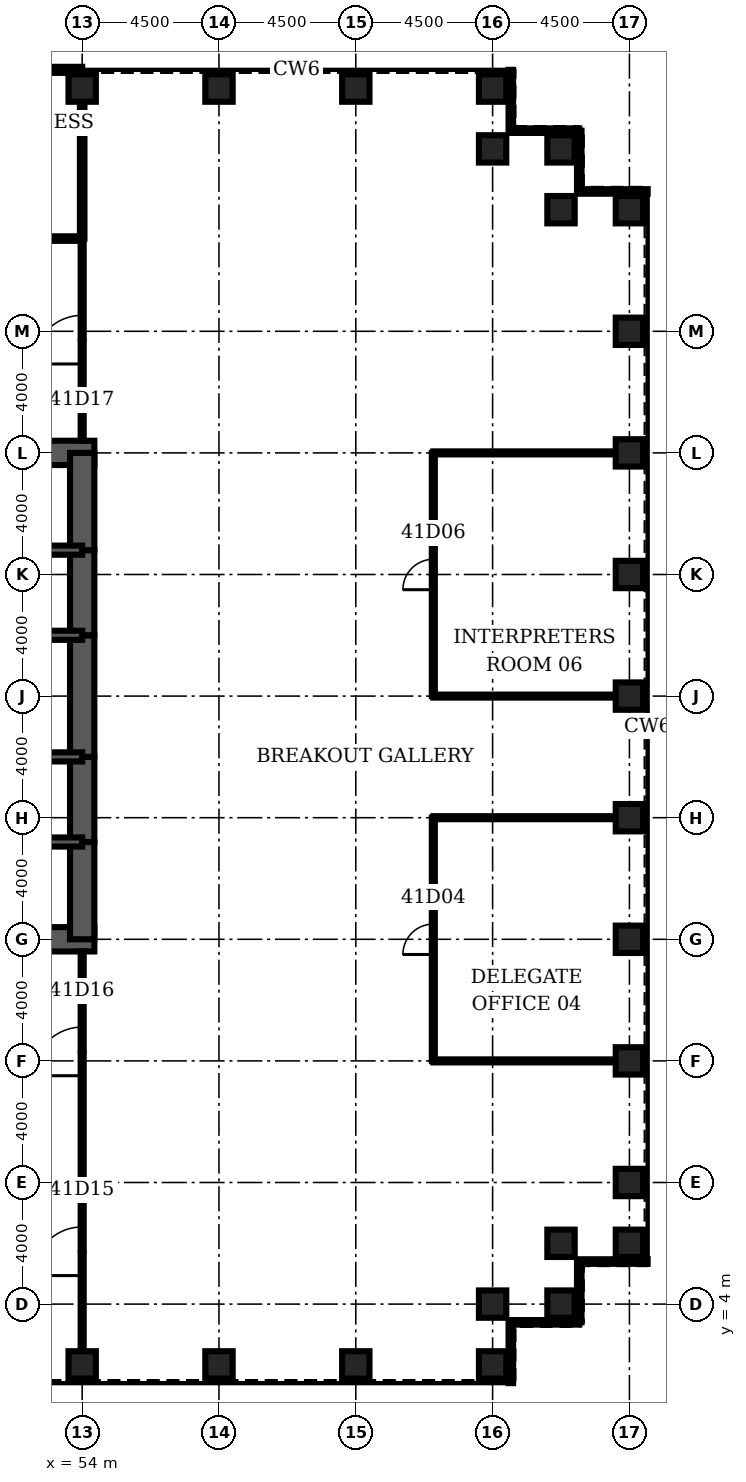
"""IFC4 building model, lengths in metres.
Left out: names, types, materials, properties, quantities, classifications, styles, units other than length and angle.
Written with IfcOpenShell. Run it as: python <this file> out.ifc"""

import sys

from ifc_helpers import new_model, si_unit, direction, frame, frame_2d, origin, origin_2d, place, context, subcontext, project, spatial, rectangle, hollow_rectangle, extrude, element, fill, save


model = new_model("IFC4")
c1 = context("Model", 3, precision=1e-05, world=origin(), true_north=direction((0.0, 1.0)))
c2 = subcontext(c1, "Body", "Model", "MODEL_VIEW")
j1 = project(units=[si_unit("LENGTHUNIT", "METRE"), si_unit("PLANEANGLEUNIT", "RADIAN")], contexts=[c1])
p1 = place(None, origin())
s1 = spatial("IfcSite", under=j1, at=p1, CompositionType="ELEMENT")
p2 = place(p1, origin())
s2 = spatial("IfcBuilding", under=s1, at=p2, CompositionType="ELEMENT")
p3 = place(p2, frame((0.0, 0.0, 185.8)))
s3 = spatial("IfcBuildingStorey", under=s2, at=p3, CompositionType="ELEMENT", Elevation=185.8)
for number, where, z_axis, x_axis in (
    (1, (54.0, 2.0, 0.0), (0.0, 0.0, 1.0), (0.0, 1.0, 0.0)),
    (2, (58.5, 2.0, 0.0), (0.0, 0.0, 1.0), (0.0, 1.0, 0.0)),
    (3, (63.0, 2.0, 0.0), (0.0, 0.0, 1.0), (0.0, 1.0, 0.0)),
    (4, (67.5, 2.0, 0.0), (0.0, 0.0, 1.0), (0.0, 1.0, 0.0)),
    (5, (67.5, 4.0, 0.0), (0.0, 0.0, 1.0), (0.0, 1.0, 0.0)),
    (6, (69.75, 4.0, 0.0), (0.0, 0.0, 1.0), (1.0, 0.0, 0.0)),
    (7, (69.75, 6.0, 0.0), (0.0, 0.0, 1.0), (1.0, 0.0, 0.0)),
    (8, (72.0, 6.0, 0.0), (0.0, 0.0, 1.0), (1.0, 0.0, 0.0)),
    (9, (72.0, 8.0, 0.0), (0.0, 0.0, 1.0), (1.0, 0.0, 0.0)),
    (10, (72.0, 12.0, 0.0), (0.0, 0.0, 1.0), (1.0, 0.0, 0.0)),
    (11, (72.0, 16.0, 0.0), (0.0, 0.0, 1.0), (1.0, 0.0, 0.0)),
    (12, (72.0, 20.0, 0.0), (0.0, 0.0, 1.0), (1.0, 0.0, 0.0)),
    (13, (72.0, 24.0, 0.0), (0.0, 0.0, 1.0), (1.0, 0.0, 0.0)),
    (14, (72.0, 28.0, 0.0), (0.0, 0.0, 1.0), (1.0, 0.0, 0.0)),
    (15, (72.0, 32.0, 0.0), (0.0, 0.0, 1.0), (1.0, 0.0, 0.0)),
    (16, (72.0, 36.0, 0.0), (0.0, 0.0, 1.0), (1.0, 0.0, 0.0)),
    (17, (72.0, 40.0, 0.0), (0.0, 0.0, 1.0), (1.0, 0.0, 0.0)),
    (18, (69.75, 40.0, 0.0), (0.0, 0.0, 1.0), (1.0, 0.0, 0.0)),
    (19, (69.75, 42.0, 0.0), (0.0, 0.0, 1.0), (1.0, 0.0, 0.0)),
    (20, (67.5, 42.0, 0.0), (0.0, 0.0, 1.0), (0.0, 1.0, 0.0)),
    (21, (67.5, 44.0, 0.0), (0.0, 0.0, 1.0), (0.0, 1.0, 0.0)),
    (22, (63.0, 44.0, 0.0), (0.0, 0.0, 1.0), (0.0, 1.0, 0.0)),
    (23, (58.5, 44.0, 0.0), (0.0, 0.0, 1.0), (0.0, 1.0, 0.0)),
    (24, (54.0, 44.0, 0.0), (0.0, 0.0, 1.0), (0.0, 1.0, 0.0)),
):
    element("IfcColumn", number, at=place(p3, frame(where, z_axis=z_axis, x_axis=x_axis)), inside=s3, PredefinedType="COLUMN", context=c2, shape_type="SweptSolid", body=[
        extrude(hollow_rectangle(XDim=0.9, YDim=0.9, WallThickness=0.09, at=origin_2d()), origin(), (0.0, 0.0, 1.0), 4.2),
    ])
for number, where, z_axis, x_axis in (
    (25, (45.0, 16.0, 0.0), (0.0, 0.0, 1.0), (1.0, 0.0, 0.0)),
    (26, (54.4, 32.0, 0.0), (0.0, 0.0, 1.0), (-1.0, 0.0, 0.0)),
):
    element("IfcWall", number, at=place(p3, frame(where, z_axis=z_axis, x_axis=x_axis)), inside=s3, PredefinedType="SHEAR", context=c2, shape_type="SweptSolid", body=[
        extrude(rectangle(XDim=9.4, YDim=0.8, at=frame_2d((4.7, 0.0))), origin(), (0.0, 0.0, 1.0), 4.2),
    ])
p4 = place(p3, frame((54.0, 16.0, 0.0), z_axis=(0.0, 0.0, 1.0), x_axis=(0.0, 1.0, 0.0)))
e27 = element("IfcWall", 27, at=p4, inside=s3, PredefinedType="SHEAR", context=c2, shape_type="SweptSolid", body=[
    extrude(rectangle(XDim=3.2, YDim=0.8, at=frame_2d((1.6, 0.0))), origin(), (0.0, 0.0, 1.0), 4.2),
])
p5 = place(p3, frame((54.0, 19.2, 0.0), z_axis=(0.0, 0.0, 1.0), x_axis=(0.0, 1.0, 0.0)))
e28 = element("IfcWall", 28, at=p5, inside=s3, PredefinedType="SHEAR", context=c2, shape_type="SweptSolid", body=[
    extrude(rectangle(XDim=2.8, YDim=0.8, at=frame_2d((1.4, 0.0))), origin(), (0.0, 0.0, 1.0), 4.2),
])
p6 = place(p5, frame((0.4, 0.0, 0.0)))
e29 = element("IfcOpeningElement", 29, at=p6, cuts=e28, PredefinedType="OPENING", context=c2, shape_type="SweptSolid", body=[
    extrude(rectangle(XDim=1.8, YDim=2.1, at=frame_2d((0.9, 1.05))), frame((0.0, 0.41, 0.0), z_axis=(0.0, -1.0, 0.0), x_axis=(1.0, 0.0, 0.0)), (0.0, 0.0, 1.0), 0.82),
])
p7 = place(p3, frame((54.0, 22.0, 0.0), z_axis=(0.0, 0.0, 1.0), x_axis=(0.0, 1.0, 0.0)))
e30 = element("IfcWall", 30, at=p7, inside=s3, PredefinedType="SHEAR", context=c2, shape_type="SweptSolid", body=[
    extrude(rectangle(XDim=4.0, YDim=0.8, at=frame_2d((2.0, 0.0))), origin(), (0.0, 0.0, 1.0), 4.2),
])
p8 = place(p3, frame((54.0, 26.0, 0.0), z_axis=(0.0, 0.0, 1.0), x_axis=(0.0, 1.0, 0.0)))
e31 = element("IfcWall", 31, at=p8, inside=s3, PredefinedType="SHEAR", context=c2, shape_type="SweptSolid", body=[
    extrude(rectangle(XDim=2.8, YDim=0.8, at=frame_2d((1.4, 0.0))), origin(), (0.0, 0.0, 1.0), 4.2),
])
p9 = place(p8, frame((0.6, 0.0, 0.0)))
e32 = element("IfcOpeningElement", 32, at=p9, cuts=e31, PredefinedType="OPENING", context=c2, shape_type="SweptSolid", body=[
    extrude(rectangle(XDim=1.8, YDim=2.1, at=frame_2d((0.9, 1.05))), frame((0.0, 0.41, 0.0), z_axis=(0.0, -1.0, 0.0), x_axis=(1.0, 0.0, 0.0)), (0.0, 0.0, 1.0), 0.82),
])
p10 = place(p3, frame((54.0, 28.8, 0.0), z_axis=(0.0, 0.0, 1.0), x_axis=(0.0, 1.0, 0.0)))
e33 = element("IfcWall", 33, at=p10, inside=s3, PredefinedType="SHEAR", context=c2, shape_type="SweptSolid", body=[
    extrude(rectangle(XDim=3.2, YDim=0.8, at=frame_2d((1.6, 0.0))), origin(), (0.0, 0.0, 1.0), 4.2),
])
p11 = place(p3, frame((45.0, 19.2, 0.0), z_axis=(0.0, 0.0, 1.0), x_axis=(1.0, 0.0, 0.0)))
e34 = element("IfcWall", 34, at=p11, inside=s3, PredefinedType="SOLIDWALL", context=c2, shape_type="SweptSolid", body=[
    extrude(rectangle(XDim=9.0, YDim=0.3, at=frame_2d((4.5, 0.0))), origin(), (0.0, 0.0, 1.0), 4.2),
])
p12 = place(p11, frame((7.35, 0.0, 0.0)))
e35 = element("IfcOpeningElement", 35, at=p12, cuts=e34, PredefinedType="OPENING", context=c2, shape_type="SweptSolid", body=[
    extrude(rectangle(XDim=1.0, YDim=2.1, at=frame_2d((0.5, 1.05))), frame((0.0, 0.16, 0.0), z_axis=(0.0, -1.0, 0.0), x_axis=(1.0, 0.0, 0.0)), (0.0, 0.0, 1.0), 0.32),
])
p13 = place(p3, frame((45.0, 28.8, 0.0), z_axis=(0.0, 0.0, 1.0), x_axis=(1.0, 0.0, 0.0)))
e36 = element("IfcWall", 36, at=p13, inside=s3, PredefinedType="SOLIDWALL", context=c2, shape_type="SweptSolid", body=[
    extrude(rectangle(XDim=9.0, YDim=0.3, at=frame_2d((4.5, 0.0))), origin(), (0.0, 0.0, 1.0), 4.2),
])
p14 = place(p13, frame((7.35, 0.0, 0.0)))
e37 = element("IfcOpeningElement", 37, at=p14, cuts=e36, PredefinedType="OPENING", context=c2, shape_type="SweptSolid", body=[
    extrude(rectangle(XDim=1.0, YDim=2.1, at=frame_2d((0.5, 1.05))), frame((0.0, 0.16, 0.0), z_axis=(0.0, -1.0, 0.0), x_axis=(1.0, 0.0, 0.0)), (0.0, 0.0, 1.0), 0.32),
])
p15 = place(p3, frame((48.0, 22.0, 0.0), z_axis=(0.0, 0.0, 1.0), x_axis=(1.0, 0.0, 0.0)))
e38 = element("IfcWall", 38, at=p15, inside=s3, PredefinedType="SOLIDWALL", context=c2, shape_type="SweptSolid", body=[
    extrude(rectangle(XDim=6.0, YDim=0.3, at=frame_2d((3.0, 0.0))), origin(), (0.0, 0.0, 1.0), 4.2),
])
p16 = place(p15, frame((2.0, 0.0, 0.0)))
e39 = element("IfcOpeningElement", 39, at=p16, cuts=e38, PredefinedType="OPENING", context=c2, shape_type="SweptSolid", body=[
    extrude(rectangle(XDim=1.0, YDim=2.1, at=frame_2d((0.5, 1.05))), frame((0.0, 0.16, 0.0), z_axis=(0.0, -1.0, 0.0), x_axis=(1.0, 0.0, 0.0)), (0.0, 0.0, 1.0), 0.32),
])
p17 = place(p3, frame((48.0, 26.0, 0.0), z_axis=(0.0, 0.0, 1.0), x_axis=(1.0, 0.0, 0.0)))
e40 = element("IfcWall", 40, at=p17, inside=s3, PredefinedType="SOLIDWALL", context=c2, shape_type="SweptSolid", body=[
    extrude(rectangle(XDim=6.0, YDim=0.3, at=frame_2d((3.0, 0.0))), origin(), (0.0, 0.0, 1.0), 4.2),
])
for number, where, z_axis, x_axis in (
    (41, (65.55, 12.0, 0.0), (0.0, 0.0, 1.0), (1.0, 0.0, 0.0)),
    (42, (65.55, 20.0, 0.0), (0.0, 0.0, 1.0), (1.0, 0.0, 0.0)),
    (43, (65.55, 24.0, 0.0), (0.0, 0.0, 1.0), (1.0, 0.0, 0.0)),
    (44, (65.55, 32.0, 0.0), (0.0, 0.0, 1.0), (1.0, 0.0, 0.0)),
):
    element("IfcWall", number, at=place(p3, frame(where, z_axis=z_axis, x_axis=x_axis)), inside=s3, PredefinedType="PARTITIONING", context=c2, shape_type="SweptSolid", body=[
        extrude(rectangle(XDim=6.0, YDim=0.1, at=frame_2d((3.0, 0.0))), origin(), (0.0, 0.0, 1.0), 3.0),
    ])
p18 = place(p3, frame((49.5, 39.05, 0.0), z_axis=(0.0, 0.0, 1.0), x_axis=(1.0, 0.0, 0.0)))
e45 = element("IfcWall", 45, at=p18, inside=s3, PredefinedType="PARTITIONING", context=c2, shape_type="SweptSolid", body=[
    extrude(rectangle(XDim=4.5, YDim=0.15, at=frame_2d((2.25, 0.0))), origin(), (0.0, 0.0, 1.0), 3.0),
])
p19 = place(p18, frame((1.75, 0.0, 0.0)))
e46 = element("IfcOpeningElement", 46, at=p19, cuts=e45, PredefinedType="OPENING", context=c2, shape_type="SweptSolid", body=[
    extrude(rectangle(XDim=1.0, YDim=2.1, at=frame_2d((0.5, 1.05))), frame((0.0, 0.085, 0.0), z_axis=(0.0, -1.0, 0.0), x_axis=(1.0, 0.0, 0.0)), (0.0, 0.0, 1.0), 0.17),
])
p20 = place(p3, frame((54.0, 2.45, 0.0), z_axis=(0.0, 0.0, 1.0), x_axis=(0.0, 1.0, 0.0)))
e47 = element("IfcWall", 47, at=p20, inside=s3, PredefinedType="PARTITIONING", context=c2, shape_type="SweptSolid", body=[
    extrude(rectangle(XDim=13.15, YDim=0.1, at=frame_2d((6.575, 0.0))), origin(), (0.0, 0.0, 1.0), 3.0),
])
p21 = place(p20, frame((2.488, 0.0, 0.0)))
e48 = element("IfcOpeningElement", 48, at=p21, cuts=e47, PredefinedType="OPENING", context=c2, shape_type="SweptSolid", body=[
    extrude(rectangle(XDim=1.6, YDim=2.1, at=frame_2d((0.8, 1.05))), frame((0.0, 0.06, 0.0), z_axis=(0.0, -1.0, 0.0), x_axis=(1.0, 0.0, 0.0)), (0.0, 0.0, 1.0), 0.12),
])
p22 = place(p20, frame((9.062, 0.0, 0.0)))
e49 = element("IfcOpeningElement", 49, at=p22, cuts=e47, PredefinedType="OPENING", context=c2, shape_type="SweptSolid", body=[
    extrude(rectangle(XDim=1.6, YDim=2.1, at=frame_2d((0.8, 1.05))), frame((0.0, 0.06, 0.0), z_axis=(0.0, -1.0, 0.0), x_axis=(1.0, 0.0, 0.0)), (0.0, 0.0, 1.0), 0.12),
])
p23 = place(p3, frame((54.0, 32.4, 0.0), z_axis=(0.0, 0.0, 1.0), x_axis=(0.0, 1.0, 0.0)))
e50 = element("IfcWall", 50, at=p23, inside=s3, PredefinedType="PARTITIONING", context=c2, shape_type="SweptSolid", body=[
    extrude(rectangle(XDim=6.65, YDim=0.1, at=frame_2d((3.325, 0.0))), origin(), (0.0, 0.0, 1.0), 3.0),
])
p24 = place(p23, frame((2.525, 0.0, 0.0)))
e51 = element("IfcOpeningElement", 51, at=p24, cuts=e50, PredefinedType="OPENING", context=c2, shape_type="SweptSolid", body=[
    extrude(rectangle(XDim=1.6, YDim=2.1, at=frame_2d((0.8, 1.05))), frame((0.0, 0.06, 0.0), z_axis=(0.0, -1.0, 0.0), x_axis=(1.0, 0.0, 0.0)), (0.0, 0.0, 1.0), 0.12),
])
p25 = place(p3, frame((54.0, 39.05, 0.0), z_axis=(0.0, 0.0, 1.0), x_axis=(0.0, 1.0, 0.0)))
e52 = element("IfcWall", 52, at=p25, inside=s3, PredefinedType="PARTITIONING", context=c2, shape_type="SweptSolid", body=[
    extrude(rectangle(XDim=4.5, YDim=0.15, at=frame_2d((2.25, 0.0))), origin(), (0.0, 0.0, 1.0), 3.0),
])
p26 = place(p3, frame((65.55, 12.0, 0.0), z_axis=(0.0, 0.0, 1.0), x_axis=(0.0, 1.0, 0.0)))
e53 = element("IfcWall", 53, at=p26, inside=s3, PredefinedType="PARTITIONING", context=c2, shape_type="SweptSolid", body=[
    extrude(rectangle(XDim=8.0, YDim=0.1, at=frame_2d((4.0, 0.0))), origin(), (0.0, 0.0, 1.0), 3.0),
])
p27 = place(p26, frame((3.5, 0.0, 0.0)))
e54 = element("IfcOpeningElement", 54, at=p27, cuts=e53, PredefinedType="OPENING", context=c2, shape_type="SweptSolid", body=[
    extrude(rectangle(XDim=1.0, YDim=2.1, at=frame_2d((0.5, 1.05))), frame((0.0, 0.06, 0.0), z_axis=(0.0, -1.0, 0.0), x_axis=(1.0, 0.0, 0.0)), (0.0, 0.0, 1.0), 0.12),
])
p28 = place(p3, frame((65.55, 24.0, 0.0), z_axis=(0.0, 0.0, 1.0), x_axis=(0.0, 1.0, 0.0)))
e55 = element("IfcWall", 55, at=p28, inside=s3, PredefinedType="PARTITIONING", context=c2, shape_type="SweptSolid", body=[
    extrude(rectangle(XDim=8.0, YDim=0.1, at=frame_2d((4.0, 0.0))), origin(), (0.0, 0.0, 1.0), 3.0),
])
p29 = place(p28, frame((3.5, 0.0, 0.0)))
e56 = element("IfcOpeningElement", 56, at=p29, cuts=e55, PredefinedType="OPENING", context=c2, shape_type="SweptSolid", body=[
    extrude(rectangle(XDim=1.0, YDim=2.1, at=frame_2d((0.5, 1.05))), frame((0.0, 0.06, 0.0), z_axis=(0.0, -1.0, 0.0), x_axis=(1.0, 0.0, 0.0)), (0.0, 0.0, 1.0), 0.12),
])
p30 = place(p3, frame((68.1, 1.4, 0.0), z_axis=(0.0, 0.0, 1.0), x_axis=(0.0, 1.0, 0.0)))
e57 = element("IfcWall", 57, at=p30, inside=s3, PredefinedType="ELEMENTEDWALL", context=c2, shape_type="SweptSolid", body=[
    extrude(rectangle(XDim=2.0, YDim=0.15, at=frame_2d((1.0, 0.0))), origin(), (0.0, 0.0, 1.0), 4.04),
])
p31 = place(p3, frame((68.1, 3.4, 0.0), z_axis=(0.0, 0.0, 1.0), x_axis=(1.0, 0.0, 0.0)))
e58 = element("IfcWall", 58, at=p31, inside=s3, PredefinedType="ELEMENTEDWALL", context=c2, shape_type="SweptSolid", body=[
    extrude(rectangle(XDim=2.25, YDim=0.15, at=frame_2d((1.125, 0.0))), origin(), (0.0, 0.0, 1.0), 4.04),
])
p32 = place(p3, frame((70.35, 3.4, 0.0), z_axis=(0.0, 0.0, 1.0), x_axis=(0.0, 1.0, 0.0)))
e59 = element("IfcWall", 59, at=p32, inside=s3, PredefinedType="ELEMENTEDWALL", context=c2, shape_type="SweptSolid", body=[
    extrude(rectangle(XDim=2.0, YDim=0.15, at=frame_2d((1.0, 0.0))), origin(), (0.0, 0.0, 1.0), 4.04),
])
for number, where, z_axis, x_axis in (
    (60, (70.35, 5.4, 0.0), (0.0, 0.0, 1.0), (1.0, 0.0, 0.0)),
    (61, (72.6, 40.6, 0.0), (0.0, 0.0, 1.0), (-1.0, 0.0, 0.0)),
):
    element("IfcWall", number, at=place(p3, frame(where, z_axis=z_axis, x_axis=x_axis)), inside=s3, PredefinedType="ELEMENTEDWALL", context=c2, shape_type="SweptSolid", body=[
        extrude(rectangle(XDim=2.25, YDim=0.15, at=frame_2d((1.125, 0.0))), origin(), (0.0, 0.0, 1.0), 4.04),
    ])
p33 = place(p3, frame((70.35, 40.6, 0.0), z_axis=(0.0, 0.0, 1.0), x_axis=(0.0, 1.0, 0.0)))
e62 = element("IfcWall", 62, at=p33, inside=s3, PredefinedType="ELEMENTEDWALL", context=c2, shape_type="SweptSolid", body=[
    extrude(rectangle(XDim=2.0, YDim=0.15, at=frame_2d((1.0, 0.0))), origin(), (0.0, 0.0, 1.0), 4.04),
])
p34 = place(p3, frame((70.35, 42.6, 0.0), z_axis=(0.0, 0.0, 1.0), x_axis=(-1.0, 0.0, 0.0)))
e63 = element("IfcWall", 63, at=p34, inside=s3, PredefinedType="ELEMENTEDWALL", context=c2, shape_type="SweptSolid", body=[
    extrude(rectangle(XDim=2.25, YDim=0.15, at=frame_2d((1.125, 0.0))), origin(), (0.0, 0.0, 1.0), 4.04),
])
p35 = place(p3, frame((68.1, 42.6, 0.0), z_axis=(0.0, 0.0, 1.0), x_axis=(0.0, 1.0, 0.0)))
e64 = element("IfcWall", 64, at=p35, inside=s3, PredefinedType="ELEMENTEDWALL", context=c2, shape_type="SweptSolid", body=[
    extrude(rectangle(XDim=2.0, YDim=0.15, at=frame_2d((1.0, 0.0))), origin(), (0.0, 0.0, 1.0), 4.04),
])
p36 = place(p3, frame((54.0, 44.6, 0.0), z_axis=(0.0, 0.0, 1.0), x_axis=(-1.0, 0.0, 0.0)))
e65 = element("IfcWall", 65, at=p36, inside=s3, PredefinedType="SOLIDWALL", context=c2, shape_type="SweptSolid", body=[
    extrude(rectangle(XDim=4.5, YDim=0.2, at=frame_2d((2.25, 0.0))), origin(), (0.0, 0.0, 1.0), 4.04),
])
p37 = place(p36, frame((1.75, 0.0, 0.0)))
e66 = element("IfcOpeningElement", 66, at=p37, cuts=e65, PredefinedType="OPENING", context=c2, shape_type="SweptSolid", body=[
    extrude(rectangle(XDim=1.0, YDim=2.1, at=frame_2d((0.5, 1.05))), frame((0.0, 0.11, 0.0), z_axis=(0.0, -1.0, 0.0), x_axis=(1.0, 0.0, 0.0)), (0.0, 0.0, 1.0), 0.22),
])
p38 = place(p27, origin())
e67 = element("IfcDoor", 67, at=p38, inside=s3, OperationType="SINGLE_SWING_LEFT", PredefinedType="DOOR", context=c2, shape_type="SweptSolid", body=[
    extrude(rectangle(XDim=1.0, YDim=2.1, at=frame_2d((0.5, 1.05))), frame((0.0, 0.025, 0.0), z_axis=(0.0, -1.0, 0.0), x_axis=(1.0, 0.0, 0.0)), (0.0, 0.0, 1.0), 0.05),
])
fill(e54, e67)
p39 = place(p29, origin())
e68 = element("IfcDoor", 68, at=p39, inside=s3, OperationType="SINGLE_SWING_LEFT", PredefinedType="DOOR", context=c2, shape_type="SweptSolid", body=[
    extrude(rectangle(XDim=1.0, YDim=2.1, at=frame_2d((0.5, 1.05))), frame((0.0, 0.025, 0.0), z_axis=(0.0, -1.0, 0.0), x_axis=(1.0, 0.0, 0.0)), (0.0, 0.0, 1.0), 0.05),
])
fill(e56, e68)
p40 = place(p21, origin())
e69 = element("IfcDoor", 69, at=p40, inside=s3, OperationType="SINGLE_SWING_LEFT", PredefinedType="DOOR", context=c2, shape_type="SweptSolid", body=[
    extrude(rectangle(XDim=1.6, YDim=2.1, at=frame_2d((0.8, 1.05))), frame((0.0, 0.025, 0.0), z_axis=(0.0, -1.0, 0.0), x_axis=(1.0, 0.0, 0.0)), (0.0, 0.0, 1.0), 0.05),
])
fill(e48, e69)
p41 = place(p22, origin())
e70 = element("IfcDoor", 70, at=p41, inside=s3, OperationType="SINGLE_SWING_LEFT", PredefinedType="DOOR", context=c2, shape_type="SweptSolid", body=[
    extrude(rectangle(XDim=1.6, YDim=2.1, at=frame_2d((0.8, 1.05))), frame((0.0, 0.025, 0.0), z_axis=(0.0, -1.0, 0.0), x_axis=(1.0, 0.0, 0.0)), (0.0, 0.0, 1.0), 0.05),
])
fill(e49, e70)
p42 = place(p24, origin())
e71 = element("IfcDoor", 71, at=p42, inside=s3, OperationType="SINGLE_SWING_LEFT", PredefinedType="DOOR", context=c2, shape_type="SweptSolid", body=[
    extrude(rectangle(XDim=1.6, YDim=2.1, at=frame_2d((0.8, 1.05))), frame((0.0, 0.025, 0.0), z_axis=(0.0, -1.0, 0.0), x_axis=(1.0, 0.0, 0.0)), (0.0, 0.0, 1.0), 0.05),
])
fill(e51, e71)
p43 = place(p12, origin())
e72 = element("IfcDoor", 72, at=p43, inside=s3, OperationType="SINGLE_SWING_RIGHT", PredefinedType="DOOR", context=c2, shape_type="SweptSolid", body=[
    extrude(rectangle(XDim=1.0, YDim=2.1, at=frame_2d((0.5, 1.05))), frame((0.0, 0.025, 0.0), z_axis=(0.0, -1.0, 0.0), x_axis=(1.0, 0.0, 0.0)), (0.0, 0.0, 1.0), 0.05),
])
fill(e35, e72)
p44 = place(p14, origin())
e73 = element("IfcDoor", 73, at=p44, inside=s3, OperationType="SINGLE_SWING_RIGHT", PredefinedType="DOOR", context=c2, shape_type="SweptSolid", body=[
    extrude(rectangle(XDim=1.0, YDim=2.1, at=frame_2d((0.5, 1.05))), frame((0.0, 0.025, 0.0), z_axis=(0.0, -1.0, 0.0), x_axis=(1.0, 0.0, 0.0)), (0.0, 0.0, 1.0), 0.05),
])
fill(e37, e73)
p45 = place(p6, origin())
e74 = element("IfcDoor", 74, at=p45, inside=s3, OperationType="SINGLE_SWING_LEFT", PredefinedType="DOOR", context=c2, shape_type="SweptSolid", body=[
    extrude(rectangle(XDim=1.8, YDim=2.1, at=frame_2d((0.9, 1.05))), frame((0.0, 0.4, 0.0), z_axis=(0.0, -1.0, 0.0), x_axis=(1.0, 0.0, 0.0)), (0.0, 0.0, 1.0), 0.8),
])
fill(e29, e74)
p46 = place(p9, origin())
e75 = element("IfcDoor", 75, at=p46, inside=s3, OperationType="SINGLE_SWING_LEFT", PredefinedType="DOOR", context=c2, shape_type="SweptSolid", body=[
    extrude(rectangle(XDim=1.8, YDim=2.1, at=frame_2d((0.9, 1.05))), frame((0.0, 0.4, 0.0), z_axis=(0.0, -1.0, 0.0), x_axis=(1.0, 0.0, 0.0)), (0.0, 0.0, 1.0), 0.8),
])
fill(e32, e75)
save(model, sys.argv[1])
